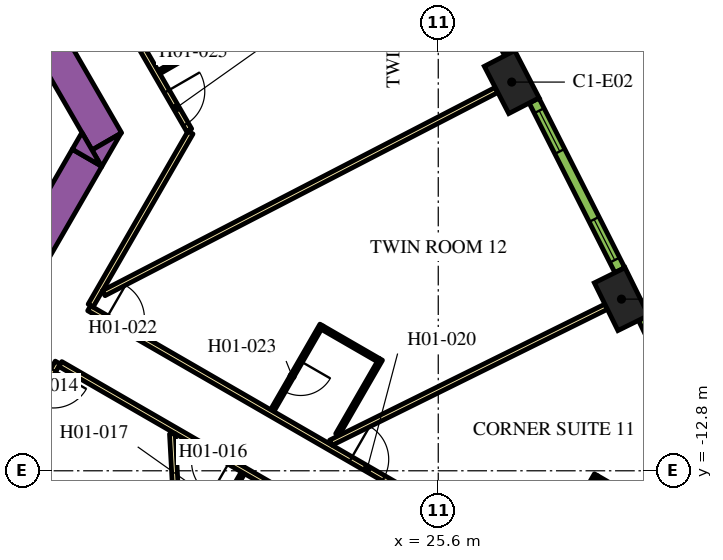
"""IFC4 building model, lengths in metres.
Left out: names, types, materials, properties, quantities, classifications, styles, units other than length and angle.
Written with IfcOpenShell. Run it as: python <this file> out.ifc"""

import sys

from ifc_helpers import new_model, si_unit, direction, frame, frame_2d, origin, origin_2d, place, context, subcontext, project, spatial, polyline, rectangle, outline, extrude, element, fill, save


model = new_model("IFC4")
c1 = context("Model", 3, precision=1e-05, world=origin(), true_north=direction((0.0, 1.0)))
c2 = subcontext(c1, "Body", "Model", "MODEL_VIEW")
j1 = project(units=[si_unit("LENGTHUNIT", "METRE"), si_unit("PLANEANGLEUNIT", "RADIAN")], contexts=[c1])
p1 = place(None, origin())
s1 = spatial("IfcSite", under=j1, at=p1, CompositionType="ELEMENT")
p2 = place(p1, origin())
s2 = spatial("IfcBuilding", under=s1, at=p2, CompositionType="ELEMENT")
p3 = place(p2, frame((0.0, 0.0, 31.5)))
s3 = spatial("IfcBuildingStorey", under=s2, at=p3, CompositionType="ELEMENT", Elevation=31.5)
for number, where, z_axis, x_axis in (
    (1, (30.421, -8.284, 0.0), (0.0, 0.0, 1.0), (-0.443, 0.897, 0.0)),
    (2, (27.533, -2.572, 0.0), (0.0, 0.0, 1.0), (-0.459, 0.888, 0.0)),
):
    element("IfcColumn", number, at=place(p3, frame(where, z_axis=z_axis, x_axis=x_axis)), inside=s3, PredefinedType="COLUMN", context=c2, shape_type="SweptSolid", body=[
        extrude(rectangle(XDim=1.4, YDim=0.9, at=origin_2d()), origin(), (0.0, 0.0, 1.0), 3.9),
    ])
p4 = place(p3, frame((6.711, 13.476, 0.0), z_axis=(0.0, 0.0, 1.0), x_axis=(0.500002723396, -0.866023831425, 0.0)))
e3 = element("IfcWall", 3, at=p4, inside=s3, PredefinedType="SOLIDWALL", context=c2, shape_type="SweptSolid", body=[
    extrude(rectangle(XDim=20.334, YDim=0.9, at=frame_2d((10.167, 0.0))), origin(), (0.0, 0.0, 1.0), 3.9),
])
p5 = place(p3, origin())
e4 = element("IfcWall", 4, at=p5, inside=s3, PredefinedType="SOLIDWALL", context=c2, shape_type="SweptSolid", body=[
    extrude(outline(polyline([(16.743, -4.8), (16.489, -4.36), (17.251, -3.92), (16.743, -4.8)])), origin(), (0.0, 0.0, 1.0), 3.9),
])
p6 = place(p3, frame((11.695, -12.644, 0.0), z_axis=(0.0, 0.0, 1.0), x_axis=(0.500010229568, 0.86601949766, 0.0)))
e5 = element("IfcWall", 5, at=p6, inside=s3, PredefinedType="SOLIDWALL", context=c2, shape_type="SweptSolid", body=[
    extrude(rectangle(XDim=9.326, YDim=0.9, at=frame_2d((4.663, 0.0))), origin(), (0.0, 0.0, 1.0), 3.9),
])
e6 = element("IfcWall", 6, at=p5, inside=s3, PredefinedType="SOLIDWALL", context=c2, shape_type="SweptSolid", body=[
    extrude(outline(polyline([(16.223, -3.9), (16.732, -4.78), (15.969, -4.34), (16.223, -3.9)])), origin(), (0.0, 0.0, 1.0), 3.9),
])
p7 = place(p3, frame((16.412, -8.523, 0.0), z_axis=(0.0, 0.0, 1.0), x_axis=(0.866022197818, -0.500005552856, 0.0)))
e7 = element("IfcWall", 7, at=p7, inside=s3, PredefinedType="PARTITIONING", context=c2, shape_type="SweptSolid", body=[
    extrude(rectangle(XDim=16.224, YDim=0.15, at=frame_2d((8.112, 0.0))), origin(), (0.0, 0.0, 1.0), 2.75),
])
p8 = place(p7, frame((7.949, 0.0, 0.0)))
e8 = element("IfcOpeningElement", 8, at=p8, cuts=e7, PredefinedType="OPENING", context=c2, shape_type="SweptSolid", body=[
    extrude(rectangle(XDim=1.0, YDim=2.1, at=frame_2d((0.5, 1.05))), frame((0.0, 0.085, 0.0), z_axis=(0.0, -1.0, 0.0), x_axis=(1.0, 0.0, 0.0)), (0.0, 0.0, 1.0), 0.17),
])
p9 = place(p7, frame((0.526, 0.0, 0.0)))
e9 = element("IfcOpeningElement", 9, at=p9, cuts=e7, PredefinedType="OPENING", context=c2, shape_type="SweptSolid", body=[
    extrude(rectangle(XDim=1.0, YDim=2.1, at=frame_2d((0.5, 1.05))), frame((0.0, 0.085, 0.0), z_axis=(0.0, -1.0, 0.0), x_axis=(1.0, 0.0, 0.0)), (0.0, 0.0, 1.0), 0.17),
])
p10 = place(p3, frame((19.081, -3.9, 0.0), z_axis=(0.0, 0.0, 1.0), x_axis=(-0.499974327079, -0.866040225545, 0.0)))
e10 = element("IfcWall", 10, at=p10, inside=s3, PredefinedType="PARTITIONING", context=c2, shape_type="SweptSolid", body=[
    extrude(rectangle(XDim=5.258, YDim=0.15, at=frame_2d((2.629, 0.0))), origin(), (0.0, 0.0, 1.0), 2.75),
])
p11 = place(p3, frame((6.163, 18.475, 0.0), z_axis=(0.0, 0.0, 1.0), x_axis=(0.500001317485, -0.866024643133, 0.0)))
e11 = element("IfcWall", 11, at=p11, inside=s3, PredefinedType="PARTITIONING", context=c2, shape_type="SweptSolid", body=[
    extrude(rectangle(XDim=25.767, YDim=0.15, at=frame_2d((12.883, 0.0))), origin(), (0.0, 0.0, 1.0), 2.75),
])
p12 = place(p11, frame((24.586, 0.0, 0.0)))
e12 = element("IfcOpeningElement", 12, at=p12, cuts=e11, PredefinedType="OPENING", context=c2, shape_type="SweptSolid", body=[
    extrude(rectangle(XDim=1.0, YDim=2.1, at=frame_2d((0.5, 1.05))), frame((0.0, 0.085, 0.0), z_axis=(0.0, -1.0, 0.0), x_axis=(1.0, 0.0, 0.0)), (0.0, 0.0, 1.0), 0.17),
])
p13 = place(p11, frame((19.319, 0.0, 0.0)))
e13 = element("IfcOpeningElement", 13, at=p13, cuts=e11, PredefinedType="OPENING", context=c2, shape_type="SweptSolid", body=[
    extrude(rectangle(XDim=1.0, YDim=2.1, at=frame_2d((0.5, 1.05))), frame((0.0, 0.085, 0.0), z_axis=(0.0, -1.0, 0.0), x_axis=(1.0, 0.0, 0.0)), (0.0, 0.0, 1.0), 0.17),
])
p14 = place(p11, frame((18.012, 0.0, 0.0)))
e14 = element("IfcOpeningElement", 14, at=p14, cuts=e11, PredefinedType="OPENING", context=c2, shape_type="SweptSolid", body=[
    extrude(rectangle(XDim=1.0, YDim=2.1, at=frame_2d((0.5, 1.05))), frame((0.0, 0.085, 0.0), z_axis=(0.0, -1.0, 0.0), x_axis=(1.0, 0.0, 0.0)), (0.0, 0.0, 1.0), 0.17),
])
p15 = place(p11, frame((6.824, 0.0, 0.0)))
e15 = element("IfcOpeningElement", 15, at=p15, cuts=e11, PredefinedType="OPENING", context=c2, shape_type="SweptSolid", body=[
    extrude(rectangle(XDim=1.1, YDim=2.1, at=frame_2d((0.55, 1.05))), frame((0.0, 0.085, 0.0), z_axis=(0.0, -1.0, 0.0), x_axis=(1.0, 0.0, 0.0)), (0.0, 0.0, 1.0), 0.17),
])
p16 = place(p11, frame((4.658, 0.0, 0.0)))
e16 = element("IfcOpeningElement", 16, at=p16, cuts=e11, PredefinedType="OPENING", context=c2, shape_type="SweptSolid", body=[
    extrude(rectangle(XDim=0.9, YDim=2.1, at=frame_2d((0.45, 1.05))), frame((0.0, 0.085, 0.0), z_axis=(0.0, -1.0, 0.0), x_axis=(1.0, 0.0, 0.0)), (0.0, 0.0, 1.0), 0.17),
])
p17 = place(p11, frame((0.18, 0.0, 0.0)))
e17 = element("IfcOpeningElement", 17, at=p17, cuts=e11, PredefinedType="OPENING", context=c2, shape_type="SweptSolid", body=[
    extrude(rectangle(XDim=1.0, YDim=2.1, at=frame_2d((0.5, 1.05))), frame((0.0, 0.085, 0.0), z_axis=(0.0, -1.0, 0.0), x_axis=(1.0, 0.0, 0.0)), (0.0, 0.0, 1.0), 0.17),
])
p18 = place(p3, frame((15.587, -9.952, 0.0), z_axis=(0.0, 0.0, 1.0), x_axis=(-0.500016618951, -0.866015808616, 0.0)))
e18 = element("IfcWall", 18, at=p18, inside=s3, PredefinedType="PARTITIONING", context=c2, shape_type="SweptSolid", body=[
    extrude(rectangle(XDim=5.268, YDim=0.15, at=frame_2d((2.634, 0.0))), origin(), (0.0, 0.0, 1.0), 2.75),
])
p19 = place(p18, frame((0.225, 0.0, 0.0)))
e19 = element("IfcOpeningElement", 19, at=p19, cuts=e18, PredefinedType="OPENING", context=c2, shape_type="SweptSolid", body=[
    extrude(rectangle(XDim=1.0, YDim=2.1, at=frame_2d((0.5, 1.05))), frame((0.0, 0.085, 0.0), z_axis=(0.0, -1.0, 0.0), x_axis=(1.0, 0.0, 0.0)), (0.0, 0.0, 1.0), 0.17),
])
p20 = place(p3, frame((29.638, -18.064, 0.0), z_axis=(0.0, 0.0, 1.0), x_axis=(-0.866026175601, 0.499998663172, 0.0)))
e20 = element("IfcWall", 20, at=p20, inside=s3, PredefinedType="PARTITIONING", context=c2, shape_type="SweptSolid", body=[
    extrude(rectangle(XDim=16.144, YDim=0.15, at=frame_2d((8.072, 0.0))), origin(), (0.0, 0.0, 1.0), 2.75),
])
p21 = place(p20, frame((11.004, 0.0, 0.0)))
e21 = element("IfcOpeningElement", 21, at=p21, cuts=e20, PredefinedType="OPENING", context=c2, shape_type="SweptSolid", body=[
    extrude(rectangle(XDim=1.0, YDim=2.1, at=frame_2d((0.5, 1.05))), frame((0.0, 0.085, 0.0), z_axis=(0.0, -1.0, 0.0), x_axis=(1.0, 0.0, 0.0)), (0.0, 0.0, 1.0), 0.17),
])
p22 = place(p20, frame((7.275, 0.0, 0.0)))
e22 = element("IfcOpeningElement", 22, at=p22, cuts=e20, PredefinedType="OPENING", context=c2, shape_type="SweptSolid", body=[
    extrude(rectangle(XDim=1.0, YDim=2.1, at=frame_2d((0.5, 1.05))), frame((0.0, 0.085, 0.0), z_axis=(0.0, -1.0, 0.0), x_axis=(1.0, 0.0, 0.0)), (0.0, 0.0, 1.0), 0.17),
])
p23 = place(p3, frame((27.134, -2.779, 0.0), z_axis=(0.0, 0.0, 1.0), x_axis=(-0.8882049501, -0.459447457951, 0.0)))
e23 = element("IfcWall", 23, at=p23, inside=s3, PredefinedType="PARTITIONING", context=c2, shape_type="SweptSolid", body=[
    extrude(rectangle(XDim=11.638, YDim=0.15, at=frame_2d((5.819, 0.0))), origin(), (0.0, 0.0, 1.0), 2.75),
])
p24 = place(p3, frame((19.198, -22.541, 0.0), z_axis=(0.0, 0.0, 1.0), x_axis=(-0.055432210572, 0.99846245299, 0.0)))
e24 = element("IfcWall", 24, at=p24, inside=s3, PredefinedType="PARTITIONING", context=c2, shape_type="SweptSolid", body=[
    extrude(rectangle(XDim=10.729, YDim=0.15, at=frame_2d((5.365, 0.0))), origin(), (0.0, 0.0, 1.0), 2.75),
])
p25 = place(p3, frame((30.018, -8.483, 0.0), z_axis=(0.0, 0.0, 1.0), x_axis=(-0.896544505264, -0.44295366584, 0.0)))
e25 = element("IfcWall", 25, at=p25, inside=s3, PredefinedType="PARTITIONING", context=c2, shape_type="SweptSolid", body=[
    extrude(rectangle(XDim=8.079, YDim=0.15, at=frame_2d((4.04, 0.0))), origin(), (0.0, 0.0, 1.0), 2.75),
])
p26 = place(p3, frame((16.16, -14.31, 0.0), z_axis=(0.0, 0.0, 1.0), x_axis=(-0.866062058628, 0.499936506574, 0.0)))
e26 = element("IfcWall", 26, at=p26, inside=s3, PredefinedType="PARTITIONING", context=c2, shape_type="SweptSolid", body=[
    extrude(rectangle(XDim=2.6, YDim=0.1, at=frame_2d((1.3, 0.0))), origin(), (0.0, 0.0, 1.0), 2.75),
])
p27 = place(p26, frame((1.1, 0.0, 0.0)))
e27 = element("IfcOpeningElement", 27, at=p27, cuts=e26, PredefinedType="OPENING", context=c2, shape_type="SweptSolid", body=[
    extrude(rectangle(XDim=0.9, YDim=2.1, at=frame_2d((0.45, 1.05))), frame((0.0, 0.06, 0.0), z_axis=(0.0, -1.0, 0.0), x_axis=(1.0, 0.0, 0.0)), (0.0, 0.0, 1.0), 0.12),
])
p28 = place(p3, frame((20.461, -12.852, 0.0), z_axis=(0.0, 0.0, 1.0), x_axis=(-0.49997559174, -0.866039495442, 0.0)))
e28 = element("IfcWall", 28, at=p28, inside=s3, PredefinedType="PARTITIONING", context=c2, shape_type="SweptSolid", body=[
    extrude(rectangle(XDim=2.95, YDim=0.1, at=frame_2d((1.475, 0.0))), origin(), (0.0, 0.0, 1.0), 2.75),
])
p29 = place(p28, frame((0.6, 0.0, 0.0)))
e29 = element("IfcOpeningElement", 29, at=p29, cuts=e28, PredefinedType="OPENING", context=c2, shape_type="SweptSolid", body=[
    extrude(rectangle(XDim=0.9, YDim=2.1, at=frame_2d((0.45, 1.05))), frame((0.0, 0.06, 0.0), z_axis=(0.0, -1.0, 0.0), x_axis=(1.0, 0.0, 0.0)), (0.0, 0.0, 1.0), 0.12),
])
p30 = place(p3, frame((29.752, -12.905, 0.0), z_axis=(0.0, 0.0, 1.0), x_axis=(-0.500049511043, -0.865996816683, 0.0)))
e30 = element("IfcWall", 30, at=p30, inside=s3, PredefinedType="PARTITIONING", context=c2, shape_type="SweptSolid", body=[
    extrude(rectangle(XDim=2.8, YDim=0.1, at=frame_2d((1.4, 0.0))), origin(), (0.0, 0.0, 1.0), 2.75),
])
p31 = place(p30, frame((1.3, 0.0, 0.0)))
e31 = element("IfcOpeningElement", 31, at=p31, cuts=e30, PredefinedType="OPENING", context=c2, shape_type="SweptSolid", body=[
    extrude(rectangle(XDim=0.9, YDim=2.1, at=frame_2d((0.45, 1.05))), frame((0.0, 0.06, 0.0), z_axis=(0.0, -1.0, 0.0), x_axis=(1.0, 0.0, 0.0)), (0.0, 0.0, 1.0), 0.12),
])
p32 = place(p3, frame((29.771, -12.973, 0.0), z_axis=(0.0, 0.0, 1.0), x_axis=(0.865980596518, -0.500077600433, 0.0)))
e32 = element("IfcWall", 32, at=p32, inside=s3, PredefinedType="PARTITIONING", context=c2, shape_type="SweptSolid", body=[
    extrude(rectangle(XDim=2.4, YDim=0.1, at=frame_2d((1.2, 0.0))), origin(), (0.0, 0.0, 1.0), 2.75),
])
p33 = place(p3, frame((22.53, -8.966, 0.0), z_axis=(0.0, 0.0, 1.0), x_axis=(-0.500006934395, -0.866021400173, 0.0)))
e33 = element("IfcWall", 33, at=p33, inside=s3, PredefinedType="PARTITIONING", context=c2, shape_type="SweptSolid", body=[
    extrude(rectangle(XDim=2.6, YDim=0.1, at=frame_2d((1.3, 0.0))), origin(), (0.0, 0.0, 1.0), 2.75),
])
p34 = place(p33, frame((1.1, 0.0, 0.0)))
e34 = element("IfcOpeningElement", 34, at=p34, cuts=e33, PredefinedType="OPENING", context=c2, shape_type="SweptSolid", body=[
    extrude(rectangle(XDim=0.9, YDim=2.1, at=frame_2d((0.45, 1.05))), frame((0.0, 0.06, 0.0), z_axis=(0.0, -1.0, 0.0), x_axis=(1.0, 0.0, 0.0)), (0.0, 0.0, 1.0), 0.12),
])
p35 = place(p3, frame((22.549, -9.035, 0.0), z_axis=(0.0, 0.0, 1.0), x_axis=(0.86605165483, -0.499954529098, 0.0)))
e35 = element("IfcWall", 35, at=p35, inside=s3, PredefinedType="PARTITIONING", context=c2, shape_type="SweptSolid", body=[
    extrude(rectangle(XDim=1.7, YDim=0.1, at=frame_2d((0.85, 0.0))), origin(), (0.0, 0.0, 1.0), 2.75),
])
p36 = place(p3, frame((22.944, -11.85, 0.0), z_axis=(0.0, 0.0, 1.0), x_axis=(0.499968531483, 0.866043571379, 0.0)))
e36 = element("IfcWall", 36, at=p36, inside=s3, PredefinedType="PARTITIONING", context=c2, shape_type="SweptSolid", body=[
    extrude(rectangle(XDim=2.29, YDim=0.1, at=frame_2d((1.145, 0.0))), origin(), (0.0, 0.0, 1.0), 2.75),
])
p37 = place(p3, frame((18.25, -2.311, 0.0), z_axis=(0.0, 0.0, 1.0), x_axis=(0.866021400173, 0.500006934395, 0.0)))
e37 = element("IfcWall", 37, at=p37, inside=s3, PredefinedType="PARTITIONING", context=c2, shape_type="SweptSolid", body=[
    extrude(rectangle(XDim=2.6, YDim=0.1, at=frame_2d((1.3, 0.0))), origin(), (0.0, 0.0, 1.0), 2.75),
])
p38 = place(p37, frame((0.6, 0.0, 0.0)))
e38 = element("IfcOpeningElement", 38, at=p38, cuts=e37, PredefinedType="OPENING", context=c2, shape_type="SweptSolid", body=[
    extrude(rectangle(XDim=0.9, YDim=2.1, at=frame_2d((0.45, 1.05))), frame((0.0, 0.06, 0.0), z_axis=(0.0, -1.0, 0.0), x_axis=(1.0, 0.0, 0.0)), (0.0, 0.0, 1.0), 0.12),
])
p39 = place(p3, frame((33.176, -13.29, 0.0), z_axis=(0.0, 0.0, 1.0), x_axis=(-0.434664499056, 0.900592456808, 0.0)))
e39 = element("IfcWall", 39, at=p39, inside=s3, PredefinedType="SOLIDWALL", context=c2, shape_type="SweptSolid", body=[
    extrude(rectangle(XDim=5.006, YDim=0.29, at=frame_2d((2.503, 0.0))), origin(), (0.0, 0.0, 1.0), 3.65),
])
p40 = place(p39, frame((0.265, 0.0, 0.9)))
e40 = element("IfcOpeningElement", 40, at=p40, cuts=e39, PredefinedType="OPENING", context=c2, shape_type="SweptSolid", body=[
    extrude(rectangle(XDim=1.2, YDim=2.15, at=frame_2d((0.6, 1.075))), frame((0.0, 0.155, 0.0), z_axis=(0.0, -1.0, 0.0), x_axis=(1.0, 0.0, 0.0)), (0.0, 0.0, 1.0), 0.31),
])
p41 = place(p39, frame((3.496, 0.0, 0.9)))
e41 = element("IfcOpeningElement", 41, at=p41, cuts=e39, PredefinedType="OPENING", context=c2, shape_type="SweptSolid", body=[
    extrude(rectangle(XDim=1.2, YDim=2.15, at=frame_2d((0.6, 1.075))), frame((0.0, 0.155, 0.0), z_axis=(0.0, -1.0, 0.0), x_axis=(1.0, 0.0, 0.0)), (0.0, 0.0, 1.0), 0.31),
])
p42 = place(p3, frame((30.377, -7.521, 0.0), z_axis=(0.0, 0.0, 1.0), x_axis=(-0.451233929645, 0.892405704115, 0.0)))
e42 = element("IfcWall", 42, at=p42, inside=s3, PredefinedType="SOLIDWALL", context=c2, shape_type="SweptSolid", body=[
    extrude(rectangle(XDim=4.998, YDim=0.29, at=frame_2d((2.499, 0.0))), origin(), (0.0, 0.0, 1.0), 3.65),
])
p43 = place(p42, frame((0.297, 0.0, 0.9)))
e43 = element("IfcOpeningElement", 43, at=p43, cuts=e42, PredefinedType="OPENING", context=c2, shape_type="SweptSolid", body=[
    extrude(rectangle(XDim=1.2, YDim=2.15, at=frame_2d((0.6, 1.075))), frame((0.0, 0.155, 0.0), z_axis=(0.0, -1.0, 0.0), x_axis=(1.0, 0.0, 0.0)), (0.0, 0.0, 1.0), 0.31),
])
p44 = place(p42, frame((3.501, 0.0, 0.9)))
e44 = element("IfcOpeningElement", 44, at=p44, cuts=e42, PredefinedType="OPENING", context=c2, shape_type="SweptSolid", body=[
    extrude(rectangle(XDim=1.2, YDim=2.15, at=frame_2d((0.6, 1.075))), frame((0.0, 0.155, 0.0), z_axis=(0.0, -1.0, 0.0), x_axis=(1.0, 0.0, 0.0)), (0.0, 0.0, 1.0), 0.31),
])
p45 = place(p3, frame((27.475, -1.81, 0.0), z_axis=(0.0, 0.0, 1.0), x_axis=(-0.467629620899, 0.883924509026, 0.0)))
e45 = element("IfcWall", 45, at=p45, inside=s3, PredefinedType="SOLIDWALL", context=c2, shape_type="SweptSolid", body=[
    extrude(rectangle(XDim=4.998, YDim=0.29, at=frame_2d((2.499, 0.0))), origin(), (0.0, 0.0, 1.0), 3.65),
])
p46 = place(p45, frame((0.297, 0.0, 0.9)))
e46 = element("IfcOpeningElement", 46, at=p46, cuts=e45, PredefinedType="OPENING", context=c2, shape_type="SweptSolid", body=[
    extrude(rectangle(XDim=1.2, YDim=2.15, at=frame_2d((0.6, 1.075))), frame((0.0, 0.155, 0.0), z_axis=(0.0, -1.0, 0.0), x_axis=(1.0, 0.0, 0.0)), (0.0, 0.0, 1.0), 0.31),
])
p47 = place(p45, frame((3.501, 0.0, 0.9)))
e47 = element("IfcOpeningElement", 47, at=p47, cuts=e45, PredefinedType="OPENING", context=c2, shape_type="SweptSolid", body=[
    extrude(rectangle(XDim=1.2, YDim=2.15, at=frame_2d((0.6, 1.075))), frame((0.0, 0.155, 0.0), z_axis=(0.0, -1.0, 0.0), x_axis=(1.0, 0.0, 0.0)), (0.0, 0.0, 1.0), 0.31),
])
p48 = place(p19, origin())
e48 = element("IfcDoor", 48, at=p48, inside=s3, OperationType="SINGLE_SWING_LEFT", PredefinedType="DOOR", context=c2, shape_type="SweptSolid", body=[
    extrude(rectangle(XDim=1.0, YDim=2.1, at=frame_2d((0.5, 1.05))), frame((0.0, 0.025, 0.0), z_axis=(0.0, -1.0, 0.0), x_axis=(1.0, 0.0, 0.0)), (0.0, 0.0, 1.0), 0.05),
])
fill(e19, e48)
p49 = place(p21, origin())
e49 = element("IfcDoor", 49, at=p49, inside=s3, OperationType="SINGLE_SWING_RIGHT", PredefinedType="DOOR", context=c2, shape_type="SweptSolid", body=[
    extrude(rectangle(XDim=1.0, YDim=2.1, at=frame_2d((0.5, 1.05))), frame((0.0, 0.025, 0.0), z_axis=(0.0, -1.0, 0.0), x_axis=(1.0, 0.0, 0.0)), (0.0, 0.0, 1.0), 0.05),
])
fill(e21, e49)
p50 = place(p8, origin())
e50 = element("IfcDoor", 50, at=p50, inside=s3, OperationType="SINGLE_SWING_LEFT", PredefinedType="DOOR", context=c2, shape_type="SweptSolid", body=[
    extrude(rectangle(XDim=1.0, YDim=2.1, at=frame_2d((0.5, 1.05))), frame((0.0, 0.025, 0.0), z_axis=(0.0, -1.0, 0.0), x_axis=(1.0, 0.0, 0.0)), (0.0, 0.0, 1.0), 0.05),
])
fill(e8, e50)
p51 = place(p9, origin())
e51 = element("IfcDoor", 51, at=p51, inside=s3, OperationType="SINGLE_SWING_LEFT", PredefinedType="DOOR", context=c2, shape_type="SweptSolid", body=[
    extrude(rectangle(XDim=1.0, YDim=2.1, at=frame_2d((0.5, 1.05))), frame((0.0, 0.025, 0.0), z_axis=(0.0, -1.0, 0.0), x_axis=(1.0, 0.0, 0.0)), (0.0, 0.0, 1.0), 0.05),
])
fill(e9, e51)
p52 = place(p34, origin())
e52 = element("IfcDoor", 52, at=p52, inside=s3, OperationType="SINGLE_SWING_RIGHT", PredefinedType="DOOR", context=c2, shape_type="SweptSolid", body=[
    extrude(rectangle(XDim=0.9, YDim=2.1, at=frame_2d((0.45, 1.05))), frame((0.0, 0.025, 0.0), z_axis=(0.0, -1.0, 0.0), x_axis=(1.0, 0.0, 0.0)), (0.0, 0.0, 1.0), 0.05),
])
fill(e34, e52)
p53 = place(p12, origin())
e53 = element("IfcDoor", 53, at=p53, inside=s3, OperationType="SINGLE_SWING_RIGHT", PredefinedType="DOOR", context=c2, shape_type="SweptSolid", body=[
    extrude(rectangle(XDim=1.0, YDim=2.1, at=frame_2d((0.5, 1.05))), frame((0.0, 0.025, 0.0), z_axis=(0.0, -1.0, 0.0), x_axis=(1.0, 0.0, 0.0)), (0.0, 0.0, 1.0), 0.05),
])
fill(e12, e53)
p54 = place(p38, origin())
e54 = element("IfcDoor", 54, at=p54, inside=s3, OperationType="SINGLE_SWING_LEFT", PredefinedType="DOOR", context=c2, shape_type="SweptSolid", body=[
    extrude(rectangle(XDim=0.9, YDim=2.1, at=frame_2d((0.45, 1.05))), frame((0.0, 0.025, 0.0), z_axis=(0.0, -1.0, 0.0), x_axis=(1.0, 0.0, 0.0)), (0.0, 0.0, 1.0), 0.05),
])
fill(e38, e54)
p55 = place(p43, origin())
e55 = element("IfcWindow", 55, at=p55, inside=s3, PartitioningType="DOUBLE_PANEL_VERTICAL", PredefinedType="WINDOW", context=c2, shape_type="SweptSolid", body=[
    extrude(rectangle(XDim=1.2, YDim=2.15, at=frame_2d((0.6, 1.075))), frame((0.0, 0.015, 0.0), z_axis=(0.0, -1.0, 0.0), x_axis=(1.0, 0.0, 0.0)), (0.0, 0.0, 1.0), 0.06),
])
fill(e43, e55)
p56 = place(p44, origin())
e56 = element("IfcWindow", 56, at=p56, inside=s3, PartitioningType="DOUBLE_PANEL_VERTICAL", PredefinedType="WINDOW", context=c2, shape_type="SweptSolid", body=[
    extrude(rectangle(XDim=1.2, YDim=2.15, at=frame_2d((0.6, 1.075))), frame((0.0, 0.015, 0.0), z_axis=(0.0, -1.0, 0.0), x_axis=(1.0, 0.0, 0.0)), (0.0, 0.0, 1.0), 0.06),
])
fill(e44, e56)
save(model, sys.argv[1])
